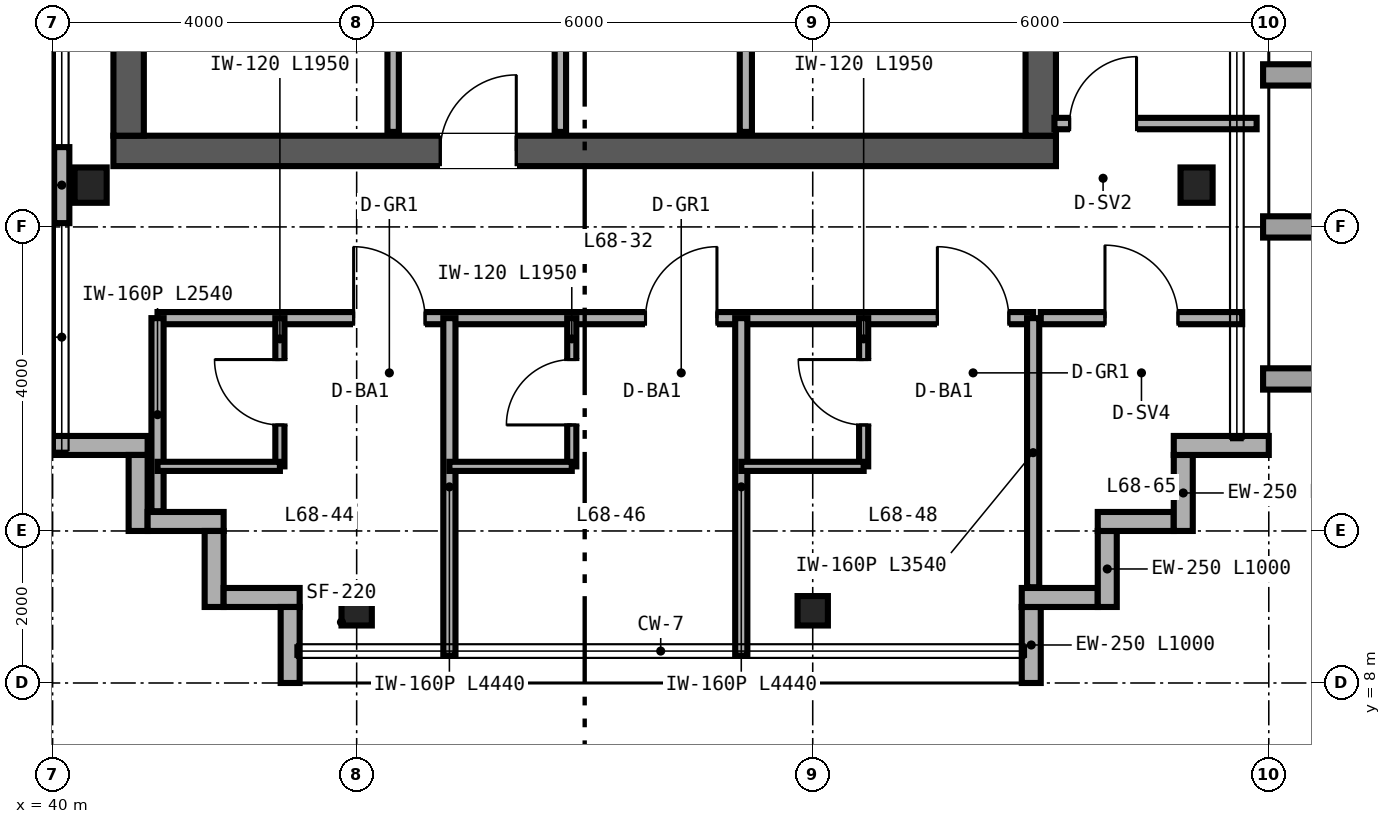
"""IFC4 building model, lengths in metres.
Left out: names, types, materials, properties, quantities, classifications, styles, units other than length and angle.
Written with IfcOpenShell. Run it as: python <this file> out.ifc"""

import sys

from ifc_helpers import new_model, si_unit, direction, frame, frame_2d, origin, origin_2d, place, context, subcontext, project, spatial, rectangle, i_section, extrude, source, transform, mapped, element, fill, save


model = new_model("IFC4")
c1 = context("Model", 3, precision=1e-05, world=origin(), true_north=direction((0.0, 1.0)))
c2 = subcontext(c1, "Body", "Model", "MODEL_VIEW")
j1 = project(units=[si_unit("LENGTHUNIT", "METRE"), si_unit("PLANEANGLEUNIT", "RADIAN")], contexts=[c1])
p1 = place(None, origin())
s1 = spatial("IfcSite", under=j1, at=p1, CompositionType="ELEMENT")
p2 = place(p1, origin())
s2 = spatial("IfcBuilding", under=s1, at=p2, CompositionType="ELEMENT")
p3 = place(p2, frame((0.0, 0.0, 268.8)))
s3 = spatial("IfcBuildingStorey", under=s2, at=p3, CompositionType="ELEMENT", Elevation=268.8)
p4 = place(p3, frame((40.8, 15.0, 0.0), z_axis=(0.0, 0.0, 1.0), x_axis=(1.0, 0.0, 0.0)))
e1 = element("IfcWall", 1, at=p4, inside=s3, PredefinedType="SHEAR", context=c2, shape_type="SweptSolid", body=[
    extrude(rectangle(XDim=12.4, YDim=0.4, at=frame_2d((6.2, 0.0))), origin(), (0.0, 0.0, 1.0), 3.28),
])
p5 = place(p4, frame((4.3, 0.0, 0.0)))
e2 = element("IfcOpeningElement", 2, at=p5, cuts=e1, PredefinedType="OPENING", context=c2, shape_type="SweptSolid", body=[
    extrude(rectangle(XDim=1.0, YDim=2.15, at=frame_2d((0.5, 1.075))), frame((0.0, 0.21, 0.0), z_axis=(0.0, -1.0, 0.0), x_axis=(1.0, 0.0, 0.0)), (0.0, 0.0, 1.0), 0.42),
])
for number, where, z_axis, x_axis in (
    (3, (41.0, 15.2, 0.0), (0.0, 0.0, 1.0), (0.0, 1.0, 0.0)),
    (4, (53.0, 15.2, 0.0), (0.0, 0.0, 1.0), (0.0, 1.0, 0.0)),
):
    element("IfcWall", number, at=place(p3, frame(where, z_axis=z_axis, x_axis=x_axis)), inside=s3, PredefinedType="SHEAR", context=c2, shape_type="SweptSolid", body=[
        extrude(rectangle(XDim=21.6, YDim=0.4, at=frame_2d((10.8, 0.0))), origin(), (0.0, 0.0, 1.0), 3.28),
    ])
m1 = source(origin(), c2, "Body", "SweptSolid", [
    extrude(i_section(OverallWidth=0.422, OverallDepth=0.465, WebThickness=0.045, FlangeThickness=0.073, FilletRadius=0.025, at=origin_2d()), origin(), (0.0, 0.0, 1.0), 3.28),
])
for number, where, z_axis, x_axis in (
    (5, (40.5, 14.55, 0.0), (0.0, 0.0, 1.0), (1.0, 0.0, 0.0)),
    (6, (55.05, 14.55, 0.0), (0.0, 0.0, 1.0), (1.0, 0.0, 0.0)),
):
    element("IfcColumn", number, at=place(p3, frame(where, z_axis=z_axis, x_axis=x_axis)), inside=s3, PredefinedType="COLUMN", context=c2, shape_type="MappedRepresentation", body=[
        mapped(m1, transform((0.0, 0.0, 0.0), scale=1.0)),
    ])
m2 = source(origin(), c2, "Body", "SweptSolid", [
    extrude(i_section(OverallWidth=0.399, OverallDepth=0.387, WebThickness=0.021, FlangeThickness=0.033, FilletRadius=0.025, at=origin_2d()), origin(), (0.0, 0.0, 1.0), 3.28),
])
for number, where, z_axis, x_axis in (
    (7, (44.0, 8.95, 0.0), (0.0, 0.0, 1.0), (1.0, 0.0, 0.0)),
    (8, (50.0, 8.95, 0.0), (0.0, 0.0, 1.0), (1.0, 0.0, 0.0)),
):
    element("IfcColumn", number, at=place(p3, frame(where, z_axis=z_axis, x_axis=x_axis)), inside=s3, PredefinedType="COLUMN", context=c2, shape_type="MappedRepresentation", body=[
        mapped(m2, transform((0.0, 0.0, 0.0), scale=1.0)),
    ])
for number, where, z_axis, x_axis in (
    (9, (52.875, 8.0, 0.0), (0.0, 0.0, 1.0), (0.0, 1.0, 0.0)),
    (10, (52.75, 9.125, 0.0), (0.0, 0.0, 1.0), (1.0, 0.0, 0.0)),
    (11, (53.875, 9.0, 0.0), (0.0, 0.0, 1.0), (0.0, 1.0, 0.0)),
    (12, (53.75, 10.125, 0.0), (0.0, 0.0, 1.0), (1.0, 0.0, 0.0)),
    (13, (54.875, 10.0, 0.0), (0.0, 0.0, 1.0), (0.0, 1.0, 0.0)),
):
    element("IfcWall", number, at=place(p3, frame(where, z_axis=z_axis, x_axis=x_axis)), inside=s3, PredefinedType="SOLIDWALL", context=c2, shape_type="SweptSolid", body=[
        extrude(rectangle(XDim=1.0, YDim=0.25, at=frame_2d((0.5, 0.0))), origin(), (0.0, 0.0, 1.0), 3.28),
    ])
for number, where, z_axis, x_axis in (
    (14, (54.75, 11.125, 0.0), (0.0, 0.0, 1.0), (1.0, 0.0, 0.0)),
    (15, (40.0, 11.125, 0.0), (0.0, 0.0, 1.0), (1.0, 0.0, 0.0)),
):
    element("IfcWall", number, at=place(p3, frame(where, z_axis=z_axis, x_axis=x_axis)), inside=s3, PredefinedType="SOLIDWALL", context=c2, shape_type="SweptSolid", body=[
        extrude(rectangle(XDim=1.25, YDim=0.25, at=frame_2d((0.625, 0.0))), origin(), (0.0, 0.0, 1.0), 3.28),
    ])
for number, where, z_axis, x_axis in (
    (16, (41.125, 11.0, 0.0), (0.0, 0.0, 1.0), (0.0, -1.0, 0.0)),
    (17, (41.25, 10.125, 0.0), (0.0, 0.0, 1.0), (1.0, 0.0, 0.0)),
    (18, (42.125, 10.0, 0.0), (0.0, 0.0, 1.0), (0.0, -1.0, 0.0)),
    (19, (42.25, 9.125, 0.0), (0.0, 0.0, 1.0), (1.0, 0.0, 0.0)),
    (20, (43.125, 9.0, 0.0), (0.0, 0.0, 1.0), (0.0, -1.0, 0.0)),
):
    element("IfcWall", number, at=place(p3, frame(where, z_axis=z_axis, x_axis=x_axis)), inside=s3, PredefinedType="SOLIDWALL", context=c2, shape_type="SweptSolid", body=[
        extrude(rectangle(XDim=1.0, YDim=0.25, at=frame_2d((0.5, 0.0))), origin(), (0.0, 0.0, 1.0), 3.28),
    ])
p6 = place(p3, frame((40.12, 14.05, 0.0), z_axis=(0.0, 0.0, 1.0), x_axis=(0.0, 1.0, 0.0)))
e21 = element("IfcWall", 21, at=p6, inside=s3, PredefinedType="PARAPET", context=c2, shape_type="SweptSolid", body=[
    extrude(rectangle(XDim=1.0, YDim=0.2, at=frame_2d((0.5, 0.0))), origin(), (0.0, 0.0, 1.0), 1.73),
])
p7 = place(p3, frame((46.68, 15.25, 0.0), z_axis=(0.0, 0.0, 1.0), x_axis=(0.0, 1.0, 0.0)))
e22 = element("IfcWall", 22, at=p7, inside=s3, PredefinedType="PARTITIONING", context=c2, shape_type="SweptSolid", body=[
    extrude(rectangle(XDim=16.13, YDim=0.15, at=frame_2d((8.065, 0.0))), origin(), (0.0, 0.0, 1.0), 2.36),
])
p8 = place(p7, frame((2.0, 0.0, 0.0)))
e23 = element("IfcOpeningElement", 23, at=p8, cuts=e22, PredefinedType="OPENING", context=c2, shape_type="SweptSolid", body=[
    extrude(rectangle(XDim=0.84, YDim=2.1, at=frame_2d((0.42, 1.05))), frame((0.0, 0.085, 0.0), z_axis=(0.0, -1.0, 0.0), x_axis=(1.0, 0.0, 0.0)), (0.0, 0.0, 1.0), 0.17),
])
p9 = place(p7, frame((7.2, 0.0, 0.0)))
e24 = element("IfcOpeningElement", 24, at=p9, cuts=e22, PredefinedType="OPENING", context=c2, shape_type="SweptSolid", body=[
    extrude(rectangle(XDim=0.84, YDim=2.1, at=frame_2d((0.42, 1.05))), frame((0.0, 0.085, 0.0), z_axis=(0.0, -1.0, 0.0), x_axis=(1.0, 0.0, 0.0)), (0.0, 0.0, 1.0), 0.17),
])
p10 = place(p7, frame((12.6, 0.0, 0.0)))
e25 = element("IfcOpeningElement", 25, at=p10, cuts=e22, PredefinedType="OPENING", context=c2, shape_type="SweptSolid", body=[
    extrude(rectangle(XDim=0.84, YDim=2.1, at=frame_2d((0.42, 1.05))), frame((0.0, 0.085, 0.0), z_axis=(0.0, -1.0, 0.0), x_axis=(1.0, 0.0, 0.0)), (0.0, 0.0, 1.0), 0.17),
])
p11 = place(p3, frame((49.12, 15.25, 0.0), z_axis=(0.0, 0.0, 1.0), x_axis=(0.0, 1.0, 0.0)))
e26 = element("IfcWall", 26, at=p11, inside=s3, PredefinedType="PARTITIONING", context=c2, shape_type="SweptSolid", body=[
    extrude(rectangle(XDim=16.13, YDim=0.16, at=frame_2d((8.065, 0.0))), origin(), (0.0, 0.0, 1.0), 2.36),
])
p12 = place(p11, frame((3.8, 0.0, 0.0)))
e27 = element("IfcOpeningElement", 27, at=p12, cuts=e26, PredefinedType="OPENING", context=c2, shape_type="SweptSolid", body=[
    extrude(rectangle(XDim=0.92, YDim=2.15, at=frame_2d((0.46, 1.075))), frame((0.0, 0.09, 0.0), z_axis=(0.0, -1.0, 0.0), x_axis=(1.0, 0.0, 0.0)), (0.0, 0.0, 1.0), 0.18),
])
p13 = place(p11, frame((11.8, 0.0, 0.0)))
e28 = element("IfcOpeningElement", 28, at=p13, cuts=e26, PredefinedType="OPENING", context=c2, shape_type="SweptSolid", body=[
    extrude(rectangle(XDim=0.9, YDim=2.15, at=frame_2d((0.45, 1.075))), frame((0.0, 0.09, 0.0), z_axis=(0.0, -1.0, 0.0), x_axis=(1.0, 0.0, 0.0)), (0.0, 0.0, 1.0), 0.18),
])
p14 = place(p3, frame((44.48, 15.25, 0.0), z_axis=(0.0, 0.0, 1.0), x_axis=(0.0, 1.0, 0.0)))
e29 = element("IfcWall", 29, at=p14, inside=s3, PredefinedType="PARTITIONING", context=c2, shape_type="SweptSolid", body=[
    extrude(rectangle(XDim=16.13, YDim=0.15, at=frame_2d((8.065, 0.0))), origin(), (0.0, 0.0, 1.0), 2.36),
])
p15 = place(p14, frame((1.6, 0.0, 0.0)))
e30 = element("IfcOpeningElement", 30, at=p15, cuts=e29, PredefinedType="OPENING", context=c2, shape_type="SweptSolid", body=[
    extrude(rectangle(XDim=0.84, YDim=2.1, at=frame_2d((0.42, 1.05))), frame((0.0, 0.085, 0.0), z_axis=(0.0, -1.0, 0.0), x_axis=(1.0, 0.0, 0.0)), (0.0, 0.0, 1.0), 0.17),
])
p16 = place(p14, frame((5.85, 0.0, 0.0)))
e31 = element("IfcOpeningElement", 31, at=p16, cuts=e29, PredefinedType="OPENING", context=c2, shape_type="SweptSolid", body=[
    extrude(rectangle(XDim=0.84, YDim=2.1, at=frame_2d((0.42, 1.05))), frame((0.0, 0.085, 0.0), z_axis=(0.0, -1.0, 0.0), x_axis=(1.0, 0.0, 0.0)), (0.0, 0.0, 1.0), 0.17),
])
p17 = place(p14, frame((10.05, 0.0, 0.0)))
e32 = element("IfcOpeningElement", 32, at=p17, cuts=e29, PredefinedType="OPENING", context=c2, shape_type="SweptSolid", body=[
    extrude(rectangle(XDim=0.84, YDim=2.1, at=frame_2d((0.42, 1.05))), frame((0.0, 0.085, 0.0), z_axis=(0.0, -1.0, 0.0), x_axis=(1.0, 0.0, 0.0)), (0.0, 0.0, 1.0), 0.17),
])
p18 = place(p3, frame((41.38, 12.8, 0.0), z_axis=(0.0, 0.0, 1.0), x_axis=(1.0, 0.0, 0.0)))
e33 = element("IfcWall", 33, at=p18, inside=s3, PredefinedType="PARTITIONING", context=c2, shape_type="SweptSolid", body=[
    extrude(rectangle(XDim=11.52, YDim=0.16, at=frame_2d((5.76, 0.0))), origin(), (0.0, 0.0, 1.0), 3.28),
])
p19 = place(p18, frame((2.58, 0.0, 0.0)))
e34 = element("IfcOpeningElement", 34, at=p19, cuts=e33, PredefinedType="OPENING", context=c2, shape_type="SweptSolid", body=[
    extrude(rectangle(XDim=0.94, YDim=2.15, at=frame_2d((0.47, 1.075))), frame((0.0, 0.09, 0.0), z_axis=(0.0, -1.0, 0.0), x_axis=(1.0, 0.0, 0.0)), (0.0, 0.0, 1.0), 0.18),
])
p20 = place(p18, frame((6.42, 0.0, 0.0)))
e35 = element("IfcOpeningElement", 35, at=p20, cuts=e33, PredefinedType="OPENING", context=c2, shape_type="SweptSolid", body=[
    extrude(rectangle(XDim=0.94, YDim=2.15, at=frame_2d((0.47, 1.075))), frame((0.0, 0.09, 0.0), z_axis=(0.0, -1.0, 0.0), x_axis=(1.0, 0.0, 0.0)), (0.0, 0.0, 1.0), 0.18),
])
p21 = place(p18, frame((10.26, 0.0, 0.0)))
e36 = element("IfcOpeningElement", 36, at=p21, cuts=e33, PredefinedType="OPENING", context=c2, shape_type="SweptSolid", body=[
    extrude(rectangle(XDim=0.94, YDim=2.15, at=frame_2d((0.47, 1.075))), frame((0.0, 0.09, 0.0), z_axis=(0.0, -1.0, 0.0), x_axis=(1.0, 0.0, 0.0)), (0.0, 0.0, 1.0), 0.18),
])
p22 = place(p3, frame((41.38, 10.26, 0.0), z_axis=(0.0, 0.0, 1.0), x_axis=(0.0, 1.0, 0.0)))
e37 = element("IfcWall", 37, at=p22, inside=s3, PredefinedType="PARTITIONING", context=c2, shape_type="SweptSolid", body=[
    extrude(rectangle(XDim=2.54, YDim=0.16, at=frame_2d((1.27, 0.0))), origin(), (0.0, 0.0, 1.0), 3.28),
])
p23 = place(p3, frame((52.9, 9.26, 0.0), z_axis=(0.0, 0.0, 1.0), x_axis=(0.0, 1.0, 0.0)))
e38 = element("IfcWall", 38, at=p23, inside=s3, PredefinedType="PARTITIONING", context=c2, shape_type="SweptSolid", body=[
    extrude(rectangle(XDim=3.54, YDim=0.16, at=frame_2d((1.77, 0.0))), origin(), (0.0, 0.0, 1.0), 3.28),
])
p24 = place(p3, frame((45.22, 8.36, 0.0), z_axis=(0.0, 0.0, 1.0), x_axis=(0.0, 1.0, 0.0)))
e39 = element("IfcWall", 39, at=p24, inside=s3, PredefinedType="PARTITIONING", context=c2, shape_type="SweptSolid", body=[
    extrude(rectangle(XDim=4.44, YDim=0.16, at=frame_2d((2.22, 0.0))), origin(), (0.0, 0.0, 1.0), 2.587),
])
p25 = place(p3, frame((42.99, 10.85, 0.0), z_axis=(0.0, 0.0, 1.0), x_axis=(0.0, 1.0, 0.0)))
e40 = element("IfcWall", 40, at=p25, inside=s3, PredefinedType="PARTITIONING", context=c2, shape_type="SweptSolid", body=[
    extrude(rectangle(XDim=1.95, YDim=0.12, at=frame_2d((0.975, 0.0))), origin(), (0.0, 0.0, 1.0), 3.28),
])
p26 = place(p25, frame((0.545, 0.0, 0.0)))
e41 = element("IfcOpeningElement", 41, at=p26, cuts=e40, PredefinedType="OPENING", context=c2, shape_type="SweptSolid", body=[
    extrude(rectangle(XDim=0.86, YDim=2.1, at=frame_2d((0.43, 1.05))), frame((0.0, 0.07, 0.0), z_axis=(0.0, -1.0, 0.0), x_axis=(1.0, 0.0, 0.0)), (0.0, 0.0, 1.0), 0.14),
])
p27 = place(p3, frame((41.38, 10.85, 0.0), z_axis=(0.0, 0.0, 1.0), x_axis=(1.0, 0.0, 0.0)))
e42 = element("IfcWall", 42, at=p27, inside=s3, PredefinedType="PARTITIONING", context=c2, shape_type="SweptSolid", body=[
    extrude(rectangle(XDim=1.61, YDim=0.12, at=frame_2d((0.805, 0.0))), origin(), (0.0, 0.0, 1.0), 3.28),
])
p28 = place(p3, frame((49.06, 8.36, 0.0), z_axis=(0.0, 0.0, 1.0), x_axis=(0.0, 1.0, 0.0)))
e43 = element("IfcWall", 43, at=p28, inside=s3, PredefinedType="PARTITIONING", context=c2, shape_type="SweptSolid", body=[
    extrude(rectangle(XDim=4.44, YDim=0.16, at=frame_2d((2.22, 0.0))), origin(), (0.0, 0.0, 1.0), 2.587),
])
p29 = place(p3, frame((46.83, 10.85, 0.0), z_axis=(0.0, 0.0, 1.0), x_axis=(0.0, 1.0, 0.0)))
e44 = element("IfcWall", 44, at=p29, inside=s3, PredefinedType="PARTITIONING", context=c2, shape_type="SweptSolid", body=[
    extrude(rectangle(XDim=1.95, YDim=0.12, at=frame_2d((0.975, 0.0))), origin(), (0.0, 0.0, 1.0), 3.28),
])
p30 = place(p29, frame((0.545, 0.0, 0.0)))
e45 = element("IfcOpeningElement", 45, at=p30, cuts=e44, PredefinedType="OPENING", context=c2, shape_type="SweptSolid", body=[
    extrude(rectangle(XDim=0.86, YDim=2.1, at=frame_2d((0.43, 1.05))), frame((0.0, 0.07, 0.0), z_axis=(0.0, -1.0, 0.0), x_axis=(1.0, 0.0, 0.0)), (0.0, 0.0, 1.0), 0.14),
])
p31 = place(p3, frame((45.22, 10.85, 0.0), z_axis=(0.0, 0.0, 1.0), x_axis=(1.0, 0.0, 0.0)))
e46 = element("IfcWall", 46, at=p31, inside=s3, PredefinedType="PARTITIONING", context=c2, shape_type="SweptSolid", body=[
    extrude(rectangle(XDim=1.61, YDim=0.12, at=frame_2d((0.805, 0.0))), origin(), (0.0, 0.0, 1.0), 3.28),
])
p32 = place(p3, frame((50.67, 10.85, 0.0), z_axis=(0.0, 0.0, 1.0), x_axis=(0.0, 1.0, 0.0)))
e47 = element("IfcWall", 47, at=p32, inside=s3, PredefinedType="PARTITIONING", context=c2, shape_type="SweptSolid", body=[
    extrude(rectangle(XDim=1.95, YDim=0.12, at=frame_2d((0.975, 0.0))), origin(), (0.0, 0.0, 1.0), 3.28),
])
p33 = place(p32, frame((0.545, 0.0, 0.0)))
e48 = element("IfcOpeningElement", 48, at=p33, cuts=e47, PredefinedType="OPENING", context=c2, shape_type="SweptSolid", body=[
    extrude(rectangle(XDim=0.86, YDim=2.1, at=frame_2d((0.43, 1.05))), frame((0.0, 0.07, 0.0), z_axis=(0.0, -1.0, 0.0), x_axis=(1.0, 0.0, 0.0)), (0.0, 0.0, 1.0), 0.14),
])
p34 = place(p3, frame((49.06, 10.85, 0.0), z_axis=(0.0, 0.0, 1.0), x_axis=(1.0, 0.0, 0.0)))
e49 = element("IfcWall", 49, at=p34, inside=s3, PredefinedType="PARTITIONING", context=c2, shape_type="SweptSolid", body=[
    extrude(rectangle(XDim=1.61, YDim=0.12, at=frame_2d((0.805, 0.0))), origin(), (0.0, 0.0, 1.0), 3.28),
])
p35 = place(p3, frame((53.18, 15.36, 0.0), z_axis=(0.0, 0.0, 1.0), x_axis=(1.0, 0.0, 0.0)))
e50 = element("IfcWall", 50, at=p35, inside=s3, PredefinedType="PARTITIONING", context=c2, shape_type="SweptSolid", body=[
    extrude(rectangle(XDim=2.66, YDim=0.15, at=frame_2d((1.33, 0.0))), origin(), (0.0, 0.0, 1.0), 2.501),
])
p36 = place(p35, frame((0.2, 0.0, 0.0)))
e51 = element("IfcOpeningElement", 51, at=p36, cuts=e50, PredefinedType="OPENING", context=c2, shape_type="SweptSolid", body=[
    extrude(rectangle(XDim=0.88, YDim=2.15, at=frame_2d((0.44, 1.075))), frame((0.0, 0.085, 0.0), z_axis=(0.0, -1.0, 0.0), x_axis=(1.0, 0.0, 0.0)), (0.0, 0.0, 1.0), 0.17),
])
p37 = place(p3, frame((53.0, 12.8, 0.0), z_axis=(0.0, 0.0, 1.0), x_axis=(1.0, 0.0, 0.0)))
e52 = element("IfcWall", 52, at=p37, inside=s3, PredefinedType="PARTITIONING", context=c2, shape_type="SweptSolid", body=[
    extrude(rectangle(XDim=2.65, YDim=0.16, at=frame_2d((1.325, 0.0))), origin(), (0.0, 0.0, 1.0), 3.28),
])
p38 = place(p37, frame((0.845, 0.0, 0.0)))
e53 = element("IfcOpeningElement", 53, at=p38, cuts=e52, PredefinedType="OPENING", context=c2, shape_type="SweptSolid", body=[
    extrude(rectangle(XDim=0.96, YDim=2.15, at=frame_2d((0.48, 1.075))), frame((0.0, 0.09, 0.0), z_axis=(0.0, -1.0, 0.0), x_axis=(1.0, 0.0, 0.0)), (0.0, 0.0, 1.0), 0.18),
])
m3 = source(origin(), c2, "Body", "SweptSolid", [
    extrude(rectangle(XDim=1.0, YDim=2.15, at=frame_2d((0.5, 1.075))), frame((0.0, 0.025, 0.0), z_axis=(0.0, -1.0, 0.0), x_axis=(1.0, 0.0, 0.0)), (0.0, 0.0, 1.0), 0.05),
])
p39 = place(p5, origin())
e54 = element("IfcDoor", 54, at=p39, inside=s3, OperationType="SINGLE_SWING_RIGHT", PredefinedType="DOOR", context=c2, shape_type="MappedRepresentation", body=[
    mapped(m3, transform((0.0, 0.0, 0.0), scale=1.0)),
])
fill(e2, e54)
m4 = source(origin(), c2, "Body", "SweptSolid", [
    extrude(rectangle(XDim=0.86, YDim=2.1, at=frame_2d((0.43, 1.05))), frame((0.0, 0.025, 0.0), z_axis=(0.0, -1.0, 0.0), x_axis=(1.0, 0.0, 0.0)), (0.0, 0.0, 1.0), 0.05),
])
p40 = place(p26, origin())
e55 = element("IfcDoor", 55, at=p40, inside=s3, OperationType="SINGLE_SWING_RIGHT", PredefinedType="DOOR", context=c2, shape_type="MappedRepresentation", body=[
    mapped(m4, transform((0.0, 0.0, 0.0), scale=1.0)),
])
fill(e41, e55)
p41 = place(p30, origin())
e56 = element("IfcDoor", 56, at=p41, inside=s3, OperationType="SINGLE_SWING_LEFT", PredefinedType="DOOR", context=c2, shape_type="MappedRepresentation", body=[
    mapped(m4, transform((0.0, 0.0, 0.0), scale=1.0)),
])
fill(e45, e56)
p42 = place(p33, origin())
e57 = element("IfcDoor", 57, at=p42, inside=s3, OperationType="SINGLE_SWING_RIGHT", PredefinedType="DOOR", context=c2, shape_type="MappedRepresentation", body=[
    mapped(m4, transform((0.0, 0.0, 0.0), scale=1.0)),
])
fill(e48, e57)
m5 = source(origin(), c2, "Body", "SweptSolid", [
    extrude(rectangle(XDim=0.94, YDim=2.15, at=frame_2d((0.47, 1.075))), frame((0.0, 0.025, 0.0), z_axis=(0.0, -1.0, 0.0), x_axis=(1.0, 0.0, 0.0)), (0.0, 0.0, 1.0), 0.05),
])
p43 = place(p19, origin())
e58 = element("IfcDoor", 58, at=p43, inside=s3, OperationType="SINGLE_SWING_LEFT", PredefinedType="DOOR", context=c2, shape_type="MappedRepresentation", body=[
    mapped(m5, transform((0.0, 0.0, 0.0), scale=1.0)),
])
fill(e34, e58)
p44 = place(p20, origin())
e59 = element("IfcDoor", 59, at=p44, inside=s3, OperationType="SINGLE_SWING_RIGHT", PredefinedType="DOOR", context=c2, shape_type="MappedRepresentation", body=[
    mapped(m5, transform((0.0, 0.0, 0.0), scale=1.0)),
])
fill(e35, e59)
p45 = place(p21, origin())
e60 = element("IfcDoor", 60, at=p45, inside=s3, OperationType="SINGLE_SWING_LEFT", PredefinedType="DOOR", context=c2, shape_type="MappedRepresentation", body=[
    mapped(m5, transform((0.0, 0.0, 0.0), scale=1.0)),
])
fill(e36, e60)
m6 = source(origin(), c2, "Body", "SweptSolid", [
    extrude(rectangle(XDim=0.88, YDim=2.15, at=frame_2d((0.44, 1.075))), frame((0.0, 0.025, 0.0), z_axis=(0.0, -1.0, 0.0), x_axis=(1.0, 0.0, 0.0)), (0.0, 0.0, 1.0), 0.05),
])
p46 = place(p36, origin())
e61 = element("IfcDoor", 61, at=p46, inside=s3, OperationType="SINGLE_SWING_RIGHT", PredefinedType="DOOR", context=c2, shape_type="MappedRepresentation", body=[
    mapped(m6, transform((0.0, 0.0, 0.0), scale=1.0)),
])
fill(e51, e61)
m7 = source(origin(), c2, "Body", "SweptSolid", [
    extrude(rectangle(XDim=0.96, YDim=2.15, at=frame_2d((0.48, 1.075))), frame((0.0, 0.025, 0.0), z_axis=(0.0, -1.0, 0.0), x_axis=(1.0, 0.0, 0.0)), (0.0, 0.0, 1.0), 0.05),
])
p47 = place(p38, origin())
e62 = element("IfcDoor", 62, at=p47, inside=s3, OperationType="SINGLE_SWING_LEFT", PredefinedType="DOOR", context=c2, shape_type="MappedRepresentation", body=[
    mapped(m7, transform((0.0, 0.0, 0.0), scale=1.0)),
])
fill(e53, e62)
save(model, sys.argv[1])
